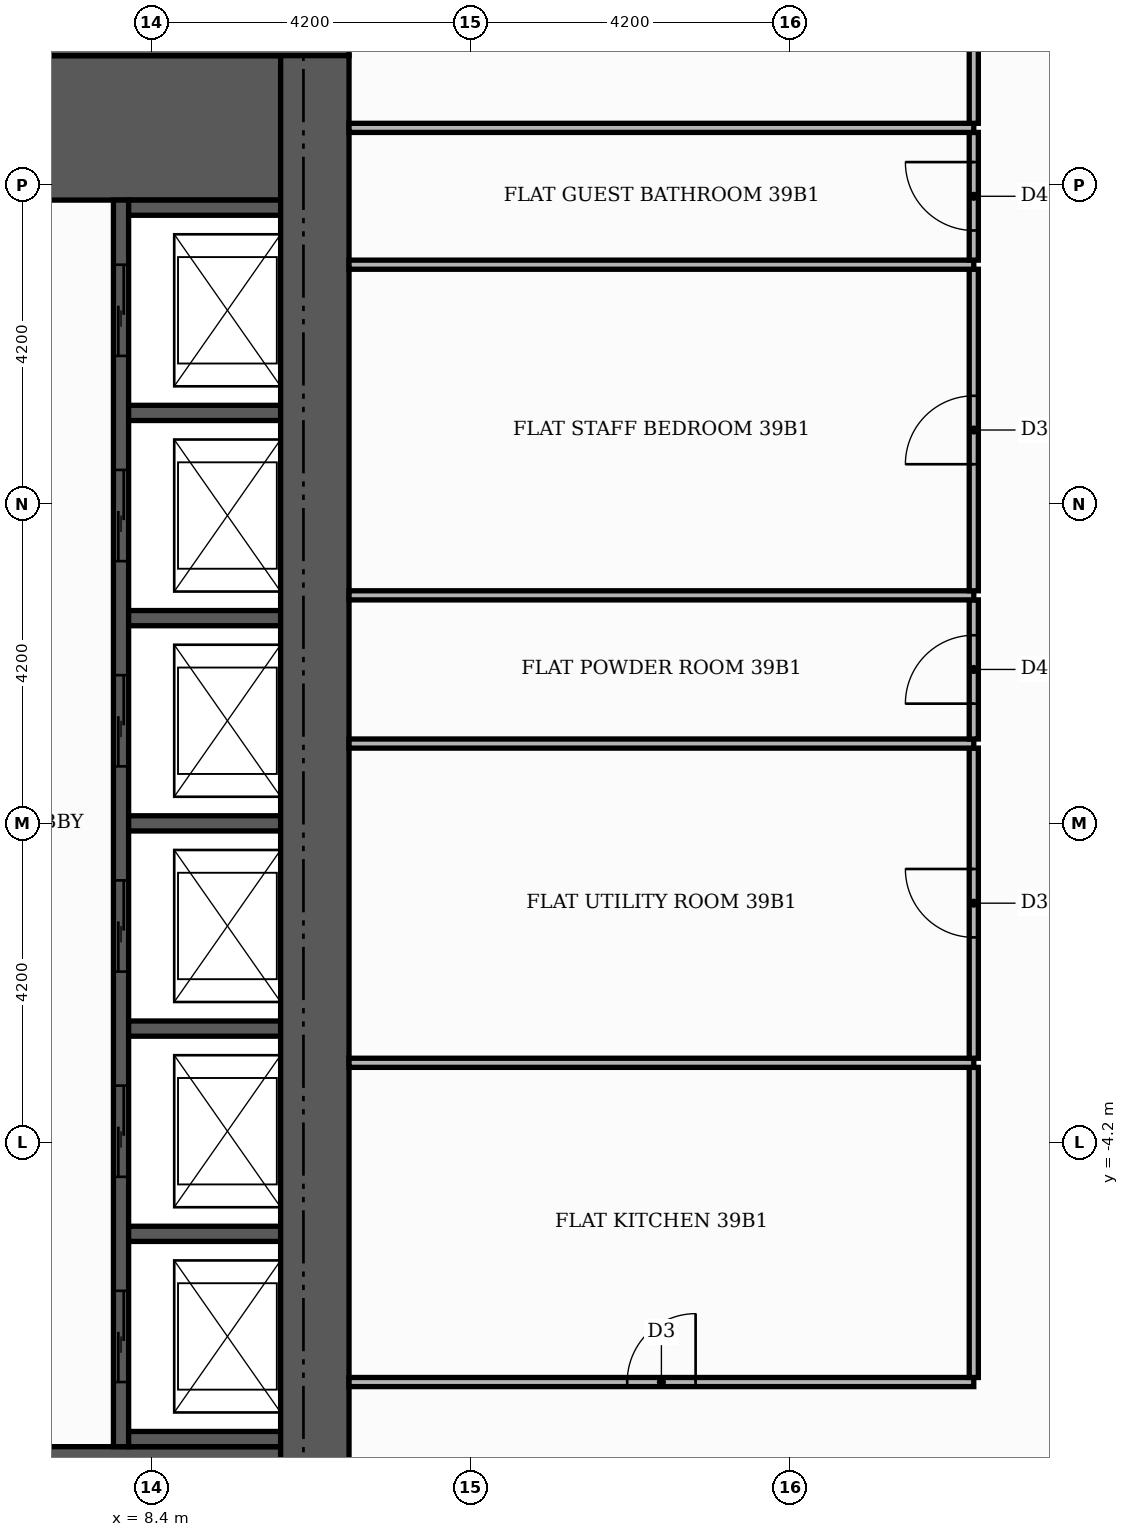
"""IFC4 building model, lengths in metres.
Left out: names, types, materials, properties, quantities, classifications, styles, units other than length and angle.
Written with IfcOpenShell. Run it as: python <this file> out.ifc"""

import sys

from ifc_helpers import new_model, si_unit, direction, frame, frame_2d, origin, place, context, subcontext, project, spatial, rectangle, extrude, element, fill, save


model = new_model("IFC4")
c1 = context("Model", 3, precision=1e-05, world=origin(), true_north=direction((0.0, 1.0)))
c2 = subcontext(c1, "Body", "Model", "MODEL_VIEW")
j1 = project(units=[si_unit("LENGTHUNIT", "METRE"), si_unit("PLANEANGLEUNIT", "RADIAN")], contexts=[c1])
p1 = place(None, origin())
s1 = spatial("IfcSite", under=j1, at=p1, CompositionType="ELEMENT")
p2 = place(p1, origin())
s2 = spatial("IfcBuilding", under=s1, at=p2, CompositionType="ELEMENT")
p3 = place(p2, frame((0.0, 0.0, 165.0)))
s3 = spatial("IfcBuildingStorey", under=s2, at=p3, CompositionType="ELEMENT", Elevation=165.0)
for number, where, z_axis, x_axis in (
    (1, (5.5, -9.15, 0.0), (0.0, 0.0, 1.0), (1.0, 0.0, 0.0)),
    (2, (5.5, 9.15, 0.0), (0.0, 0.0, 1.0), (1.0, 0.0, 0.0)),
):
    element("IfcWall", number, at=place(p3, frame(where, z_axis=z_axis, x_axis=x_axis)), inside=s3, PredefinedType="SHEAR", context=c2, shape_type="SweptSolid", body=[
        extrude(rectangle(XDim=4.6, YDim=1.9, at=frame_2d((2.3, 0.0))), origin(), (0.0, 0.0, 1.0), 3.48),
    ])
p4 = place(p3, frame((8.0, -8.2, 0.0), z_axis=(0.0, 0.0, 1.0), x_axis=(0.0, 1.0, 0.0)))
e3 = element("IfcWall", 3, at=p4, inside=s3, PredefinedType="SHEAR", context=c2, shape_type="SweptSolid", body=[
    extrude(rectangle(XDim=16.4, YDim=0.2, at=frame_2d((8.2, 0.0))), origin(), (0.0, 0.0, 1.0), 3.48),
])
p5 = place(p4, frame((0.85, 0.0, 0.0)))
e4 = element("IfcOpeningElement", 4, at=p5, cuts=e3, PredefinedType="OPENING", context=c2, shape_type="SweptSolid", body=[
    extrude(rectangle(XDim=1.2, YDim=2.1, at=frame_2d((0.6, 1.05))), frame((0.0, 0.11, 0.0), z_axis=(0.0, -1.0, 0.0), x_axis=(1.0, 0.0, 0.0)), (0.0, 0.0, 1.0), 0.22),
])
p6 = place(p4, frame((3.55, 0.0, 0.0)))
e5 = element("IfcOpeningElement", 5, at=p6, cuts=e3, PredefinedType="OPENING", context=c2, shape_type="SweptSolid", body=[
    extrude(rectangle(XDim=1.2, YDim=2.1, at=frame_2d((0.6, 1.05))), frame((0.0, 0.11, 0.0), z_axis=(0.0, -1.0, 0.0), x_axis=(1.0, 0.0, 0.0)), (0.0, 0.0, 1.0), 0.22),
])
p7 = place(p4, frame((6.25, 0.0, 0.0)))
e6 = element("IfcOpeningElement", 6, at=p7, cuts=e3, PredefinedType="OPENING", context=c2, shape_type="SweptSolid", body=[
    extrude(rectangle(XDim=1.2, YDim=2.1, at=frame_2d((0.6, 1.05))), frame((0.0, 0.11, 0.0), z_axis=(0.0, -1.0, 0.0), x_axis=(1.0, 0.0, 0.0)), (0.0, 0.0, 1.0), 0.22),
])
p8 = place(p4, frame((8.95, 0.0, 0.0)))
e7 = element("IfcOpeningElement", 7, at=p8, cuts=e3, PredefinedType="OPENING", context=c2, shape_type="SweptSolid", body=[
    extrude(rectangle(XDim=1.2, YDim=2.1, at=frame_2d((0.6, 1.05))), frame((0.0, 0.11, 0.0), z_axis=(0.0, -1.0, 0.0), x_axis=(1.0, 0.0, 0.0)), (0.0, 0.0, 1.0), 0.22),
])
p9 = place(p4, frame((11.65, 0.0, 0.0)))
e8 = element("IfcOpeningElement", 8, at=p9, cuts=e3, PredefinedType="OPENING", context=c2, shape_type="SweptSolid", body=[
    extrude(rectangle(XDim=1.2, YDim=2.1, at=frame_2d((0.6, 1.05))), frame((0.0, 0.11, 0.0), z_axis=(0.0, -1.0, 0.0), x_axis=(1.0, 0.0, 0.0)), (0.0, 0.0, 1.0), 0.22),
])
p10 = place(p4, frame((14.35, 0.0, 0.0)))
e9 = element("IfcOpeningElement", 9, at=p10, cuts=e3, PredefinedType="OPENING", context=c2, shape_type="SweptSolid", body=[
    extrude(rectangle(XDim=1.2, YDim=2.1, at=frame_2d((0.6, 1.05))), frame((0.0, 0.11, 0.0), z_axis=(0.0, -1.0, 0.0), x_axis=(1.0, 0.0, 0.0)), (0.0, 0.0, 1.0), 0.22),
])
for number, where, z_axis, x_axis in (
    (10, (8.1, -8.1, 0.0), (0.0, 0.0, 1.0), (1.0, 0.0, 0.0)),
    (11, (8.1, -5.4, 0.0), (0.0, 0.0, 1.0), (1.0, 0.0, 0.0)),
    (12, (8.1, -2.7, 0.0), (0.0, 0.0, 1.0), (1.0, 0.0, 0.0)),
    (13, (8.1, 0.0, 0.0), (0.0, 0.0, 1.0), (1.0, 0.0, 0.0)),
    (14, (8.1, 2.7, 0.0), (0.0, 0.0, 1.0), (1.0, 0.0, 0.0)),
    (15, (8.1, 5.4, 0.0), (0.0, 0.0, 1.0), (1.0, 0.0, 0.0)),
    (16, (8.1, 8.1, 0.0), (0.0, 0.0, 1.0), (1.0, 0.0, 0.0)),
):
    element("IfcWall", number, at=place(p3, frame(where, z_axis=z_axis, x_axis=x_axis)), inside=s3, PredefinedType="SHEAR", context=c2, shape_type="SweptSolid", body=[
        extrude(rectangle(XDim=2.0, YDim=0.2, at=frame_2d((1.0, 0.0))), origin(), (0.0, 0.0, 1.0), 3.48),
    ])
p11 = place(p3, frame((-11.0, 10.55, 0.0), z_axis=(0.0, 0.0, 1.0), x_axis=(1.0, 0.0, 0.0)))
e17 = element("IfcWall", 17, at=p11, inside=s3, PredefinedType="SHEAR", context=c2, shape_type="SweptSolid", body=[
    extrude(rectangle(XDim=22.0, YDim=0.9, at=frame_2d((11.0, 0.0))), origin(), (0.0, 0.0, 1.0), 3.48),
])
p12 = place(p11, frame((13.3, 0.0, 0.0)))
e18 = element("IfcOpeningElement", 18, at=p12, cuts=e17, PredefinedType="OPENING", context=c2, shape_type="SweptSolid", body=[
    extrude(rectangle(XDim=1.8, YDim=2.2, at=frame_2d((0.9, 1.1))), frame((0.0, 0.46, 0.0), z_axis=(0.0, -1.0, 0.0), x_axis=(1.0, 0.0, 0.0)), (0.0, 0.0, 1.0), 0.92),
])
p13 = place(p3, frame((10.55, -10.1, 0.0), z_axis=(0.0, 0.0, 1.0), x_axis=(0.0, 1.0, 0.0)))
e19 = element("IfcWall", 19, at=p13, inside=s3, PredefinedType="SHEAR", context=c2, shape_type="SweptSolid", body=[
    extrude(rectangle(XDim=20.2, YDim=0.9, at=frame_2d((10.1, 0.0))), origin(), (0.0, 0.0, 1.0), 3.48),
])
p14 = place(p3, frame((11.0, -7.35, 0.0), z_axis=(0.0, 0.0, 1.0), x_axis=(1.0, 0.0, 0.0)))
e20 = element("IfcWall", 20, at=p14, inside=s3, PredefinedType="PARTITIONING", context=c2, shape_type="SweptSolid", body=[
    extrude(rectangle(XDim=8.22, YDim=0.12, at=frame_2d((4.11, 0.0))), origin(), (0.0, 0.0, 1.0), 3.48),
])
p15 = place(p14, frame((3.66, 0.0, 0.0)))
e21 = element("IfcOpeningElement", 21, at=p15, cuts=e20, PredefinedType="OPENING", context=c2, shape_type="SweptSolid", body=[
    extrude(rectangle(XDim=0.9, YDim=2.1, at=frame_2d((0.45, 1.05))), frame((0.0, 0.07, 0.0), z_axis=(0.0, -1.0, 0.0), x_axis=(1.0, 0.0, 0.0)), (0.0, 0.0, 1.0), 0.14),
])
p16 = place(p3, frame((19.22, -7.29, 0.0), z_axis=(0.0, 0.0, 1.0), x_axis=(0.0, 1.0, 0.0)))
e22 = element("IfcWall", 22, at=p16, inside=s3, PredefinedType="PARTITIONING", context=c2, shape_type="SweptSolid", body=[
    extrude(rectangle(XDim=4.08, YDim=0.12, at=frame_2d((2.04, 0.0))), origin(), (0.0, 0.0, 1.0), 3.48),
])
p17 = place(p3, frame((11.0, -3.15, 0.0), z_axis=(0.0, 0.0, 1.0), x_axis=(1.0, 0.0, 0.0)))
e23 = element("IfcWall", 23, at=p17, inside=s3, PredefinedType="PARTITIONING", context=c2, shape_type="SweptSolid", body=[
    extrude(rectangle(XDim=8.22, YDim=0.12, at=frame_2d((4.11, 0.0))), origin(), (0.0, 0.0, 1.0), 3.48),
])
p18 = place(p3, frame((19.22, -3.09, 0.0), z_axis=(0.0, 0.0, 1.0), x_axis=(0.0, 1.0, 0.0)))
e24 = element("IfcWall", 24, at=p18, inside=s3, PredefinedType="PARTITIONING", context=c2, shape_type="SweptSolid", body=[
    extrude(rectangle(XDim=4.08, YDim=0.12, at=frame_2d((2.04, 0.0))), origin(), (0.0, 0.0, 1.0), 3.48),
])
p19 = place(p18, frame((1.59, 0.0, 0.0)))
e25 = element("IfcOpeningElement", 25, at=p19, cuts=e24, PredefinedType="OPENING", context=c2, shape_type="SweptSolid", body=[
    extrude(rectangle(XDim=0.9, YDim=2.1, at=frame_2d((0.45, 1.05))), frame((0.0, 0.07, 0.0), z_axis=(0.0, -1.0, 0.0), x_axis=(1.0, 0.0, 0.0)), (0.0, 0.0, 1.0), 0.14),
])
p20 = place(p3, frame((11.0, 1.05, 0.0), z_axis=(0.0, 0.0, 1.0), x_axis=(1.0, 0.0, 0.0)))
e26 = element("IfcWall", 26, at=p20, inside=s3, PredefinedType="PARTITIONING", context=c2, shape_type="SweptSolid", body=[
    extrude(rectangle(XDim=8.22, YDim=0.12, at=frame_2d((4.11, 0.0))), origin(), (0.0, 0.0, 1.0), 3.48),
])
p21 = place(p3, frame((19.22, 1.11, 0.0), z_axis=(0.0, 0.0, 1.0), x_axis=(0.0, 1.0, 0.0)))
e27 = element("IfcWall", 27, at=p21, inside=s3, PredefinedType="PARTITIONING", context=c2, shape_type="SweptSolid", body=[
    extrude(rectangle(XDim=1.83, YDim=0.12, at=frame_2d((0.915, 0.0))), origin(), (0.0, 0.0, 1.0), 3.48),
])
p22 = place(p21, frame((0.465, 0.0, 0.0)))
e28 = element("IfcOpeningElement", 28, at=p22, cuts=e27, PredefinedType="OPENING", context=c2, shape_type="SweptSolid", body=[
    extrude(rectangle(XDim=0.9, YDim=2.1, at=frame_2d((0.45, 1.05))), frame((0.0, 0.07, 0.0), z_axis=(0.0, -1.0, 0.0), x_axis=(1.0, 0.0, 0.0)), (0.0, 0.0, 1.0), 0.14),
])
p23 = place(p3, frame((11.0, 3.0, 0.0), z_axis=(0.0, 0.0, 1.0), x_axis=(1.0, 0.0, 0.0)))
e29 = element("IfcWall", 29, at=p23, inside=s3, PredefinedType="PARTITIONING", context=c2, shape_type="SweptSolid", body=[
    extrude(rectangle(XDim=8.22, YDim=0.12, at=frame_2d((4.11, 0.0))), origin(), (0.0, 0.0, 1.0), 3.48),
])
p24 = place(p3, frame((19.22, 3.06, 0.0), z_axis=(0.0, 0.0, 1.0), x_axis=(0.0, 1.0, 0.0)))
e30 = element("IfcWall", 30, at=p24, inside=s3, PredefinedType="PARTITIONING", context=c2, shape_type="SweptSolid", body=[
    extrude(rectangle(XDim=4.23, YDim=0.12, at=frame_2d((2.115, 0.0))), origin(), (0.0, 0.0, 1.0), 3.48),
])
p25 = place(p24, frame((1.665, 0.0, 0.0)))
e31 = element("IfcOpeningElement", 31, at=p25, cuts=e30, PredefinedType="OPENING", context=c2, shape_type="SweptSolid", body=[
    extrude(rectangle(XDim=0.9, YDim=2.1, at=frame_2d((0.45, 1.05))), frame((0.0, 0.07, 0.0), z_axis=(0.0, -1.0, 0.0), x_axis=(1.0, 0.0, 0.0)), (0.0, 0.0, 1.0), 0.14),
])
p26 = place(p3, frame((11.0, 7.35, 0.0), z_axis=(0.0, 0.0, 1.0), x_axis=(1.0, 0.0, 0.0)))
e32 = element("IfcWall", 32, at=p26, inside=s3, PredefinedType="PARTITIONING", context=c2, shape_type="SweptSolid", body=[
    extrude(rectangle(XDim=8.22, YDim=0.12, at=frame_2d((4.11, 0.0))), origin(), (0.0, 0.0, 1.0), 3.48),
])
p27 = place(p3, frame((19.22, 7.41, 0.0), z_axis=(0.0, 0.0, 1.0), x_axis=(0.0, 1.0, 0.0)))
e33 = element("IfcWall", 33, at=p27, inside=s3, PredefinedType="PARTITIONING", context=c2, shape_type="SweptSolid", body=[
    extrude(rectangle(XDim=1.68, YDim=0.12, at=frame_2d((0.84, 0.0))), origin(), (0.0, 0.0, 1.0), 3.48),
])
p28 = place(p27, frame((0.39, 0.0, 0.0)))
e34 = element("IfcOpeningElement", 34, at=p28, cuts=e33, PredefinedType="OPENING", context=c2, shape_type="SweptSolid", body=[
    extrude(rectangle(XDim=0.9, YDim=2.1, at=frame_2d((0.45, 1.05))), frame((0.0, 0.07, 0.0), z_axis=(0.0, -1.0, 0.0), x_axis=(1.0, 0.0, 0.0)), (0.0, 0.0, 1.0), 0.14),
])
p29 = place(p3, frame((11.0, 9.15, 0.0), z_axis=(0.0, 0.0, 1.0), x_axis=(1.0, 0.0, 0.0)))
e35 = element("IfcWall", 35, at=p29, inside=s3, PredefinedType="PARTITIONING", context=c2, shape_type="SweptSolid", body=[
    extrude(rectangle(XDim=8.22, YDim=0.12, at=frame_2d((4.11, 0.0))), origin(), (0.0, 0.0, 1.0), 3.48),
])
p30 = place(p3, frame((19.22, 9.21, 0.0), z_axis=(0.0, 0.0, 1.0), x_axis=(0.0, 1.0, 0.0)))
e36 = element("IfcWall", 36, at=p30, inside=s3, PredefinedType="PARTITIONING", context=c2, shape_type="SweptSolid", body=[
    extrude(rectangle(XDim=4.34, YDim=0.12, at=frame_2d((2.17, 0.0))), origin(), (0.0, 0.0, 1.0), 3.48),
])
p31 = place(p30, frame((1.74, 0.0, 0.0)))
e37 = element("IfcOpeningElement", 37, at=p31, cuts=e36, PredefinedType="OPENING", context=c2, shape_type="SweptSolid", body=[
    extrude(rectangle(XDim=0.9, YDim=2.1, at=frame_2d((0.45, 1.05))), frame((0.0, 0.07, 0.0), z_axis=(0.0, -1.0, 0.0), x_axis=(1.0, 0.0, 0.0)), (0.0, 0.0, 1.0), 0.14),
])
p32 = place(p5, origin())
e38 = element("IfcDoor", 38, at=p32, inside=s3, OperationType="SLIDING_TO_LEFT", PredefinedType="DOOR", context=c2, shape_type="SweptSolid", body=[
    extrude(rectangle(XDim=1.2, YDim=2.1, at=frame_2d((0.6, 1.05))), frame((0.0, 0.025, 0.0), z_axis=(0.0, -1.0, 0.0), x_axis=(1.0, 0.0, 0.0)), (0.0, 0.0, 1.0), 0.05),
])
fill(e4, e38)
p33 = place(p6, origin())
e39 = element("IfcDoor", 39, at=p33, inside=s3, OperationType="SLIDING_TO_LEFT", PredefinedType="DOOR", context=c2, shape_type="SweptSolid", body=[
    extrude(rectangle(XDim=1.2, YDim=2.1, at=frame_2d((0.6, 1.05))), frame((0.0, 0.025, 0.0), z_axis=(0.0, -1.0, 0.0), x_axis=(1.0, 0.0, 0.0)), (0.0, 0.0, 1.0), 0.05),
])
fill(e5, e39)
p34 = place(p7, origin())
e40 = element("IfcDoor", 40, at=p34, inside=s3, OperationType="SLIDING_TO_LEFT", PredefinedType="DOOR", context=c2, shape_type="SweptSolid", body=[
    extrude(rectangle(XDim=1.2, YDim=2.1, at=frame_2d((0.6, 1.05))), frame((0.0, 0.025, 0.0), z_axis=(0.0, -1.0, 0.0), x_axis=(1.0, 0.0, 0.0)), (0.0, 0.0, 1.0), 0.05),
])
fill(e6, e40)
p35 = place(p8, origin())
e41 = element("IfcDoor", 41, at=p35, inside=s3, OperationType="SLIDING_TO_LEFT", PredefinedType="DOOR", context=c2, shape_type="SweptSolid", body=[
    extrude(rectangle(XDim=1.2, YDim=2.1, at=frame_2d((0.6, 1.05))), frame((0.0, 0.025, 0.0), z_axis=(0.0, -1.0, 0.0), x_axis=(1.0, 0.0, 0.0)), (0.0, 0.0, 1.0), 0.05),
])
fill(e7, e41)
p36 = place(p9, origin())
e42 = element("IfcDoor", 42, at=p36, inside=s3, OperationType="SLIDING_TO_LEFT", PredefinedType="DOOR", context=c2, shape_type="SweptSolid", body=[
    extrude(rectangle(XDim=1.2, YDim=2.1, at=frame_2d((0.6, 1.05))), frame((0.0, 0.025, 0.0), z_axis=(0.0, -1.0, 0.0), x_axis=(1.0, 0.0, 0.0)), (0.0, 0.0, 1.0), 0.05),
])
fill(e8, e42)
p37 = place(p10, origin())
e43 = element("IfcDoor", 43, at=p37, inside=s3, OperationType="SLIDING_TO_LEFT", PredefinedType="DOOR", context=c2, shape_type="SweptSolid", body=[
    extrude(rectangle(XDim=1.2, YDim=2.1, at=frame_2d((0.6, 1.05))), frame((0.0, 0.025, 0.0), z_axis=(0.0, -1.0, 0.0), x_axis=(1.0, 0.0, 0.0)), (0.0, 0.0, 1.0), 0.05),
])
fill(e9, e43)
p38 = place(p15, origin())
e44 = element("IfcDoor", 44, at=p38, inside=s3, OperationType="SINGLE_SWING_RIGHT", PredefinedType="DOOR", context=c2, shape_type="SweptSolid", body=[
    extrude(rectangle(XDim=0.9, YDim=2.1, at=frame_2d((0.45, 1.05))), frame((0.0, 0.025, 0.0), z_axis=(0.0, -1.0, 0.0), x_axis=(1.0, 0.0, 0.0)), (0.0, 0.0, 1.0), 0.05),
])
fill(e21, e44)
p39 = place(p19, origin())
e45 = element("IfcDoor", 45, at=p39, inside=s3, OperationType="SINGLE_SWING_RIGHT", PredefinedType="DOOR", context=c2, shape_type="SweptSolid", body=[
    extrude(rectangle(XDim=0.9, YDim=2.1, at=frame_2d((0.45, 1.05))), frame((0.0, 0.025, 0.0), z_axis=(0.0, -1.0, 0.0), x_axis=(1.0, 0.0, 0.0)), (0.0, 0.0, 1.0), 0.05),
])
fill(e25, e45)
p40 = place(p22, origin())
e46 = element("IfcDoor", 46, at=p40, inside=s3, OperationType="SINGLE_SWING_LEFT", PredefinedType="DOOR", context=c2, shape_type="SweptSolid", body=[
    extrude(rectangle(XDim=0.9, YDim=2.1, at=frame_2d((0.45, 1.05))), frame((0.0, 0.025, 0.0), z_axis=(0.0, -1.0, 0.0), x_axis=(1.0, 0.0, 0.0)), (0.0, 0.0, 1.0), 0.05),
])
fill(e28, e46)
p41 = place(p25, origin())
e47 = element("IfcDoor", 47, at=p41, inside=s3, OperationType="SINGLE_SWING_LEFT", PredefinedType="DOOR", context=c2, shape_type="SweptSolid", body=[
    extrude(rectangle(XDim=0.9, YDim=2.1, at=frame_2d((0.45, 1.05))), frame((0.0, 0.025, 0.0), z_axis=(0.0, -1.0, 0.0), x_axis=(1.0, 0.0, 0.0)), (0.0, 0.0, 1.0), 0.05),
])
fill(e31, e47)
p42 = place(p28, origin())
e48 = element("IfcDoor", 48, at=p42, inside=s3, OperationType="SINGLE_SWING_RIGHT", PredefinedType="DOOR", context=c2, shape_type="SweptSolid", body=[
    extrude(rectangle(XDim=0.9, YDim=2.1, at=frame_2d((0.45, 1.05))), frame((0.0, 0.025, 0.0), z_axis=(0.0, -1.0, 0.0), x_axis=(1.0, 0.0, 0.0)), (0.0, 0.0, 1.0), 0.05),
])
fill(e34, e48)
save(model, sys.argv[1])
